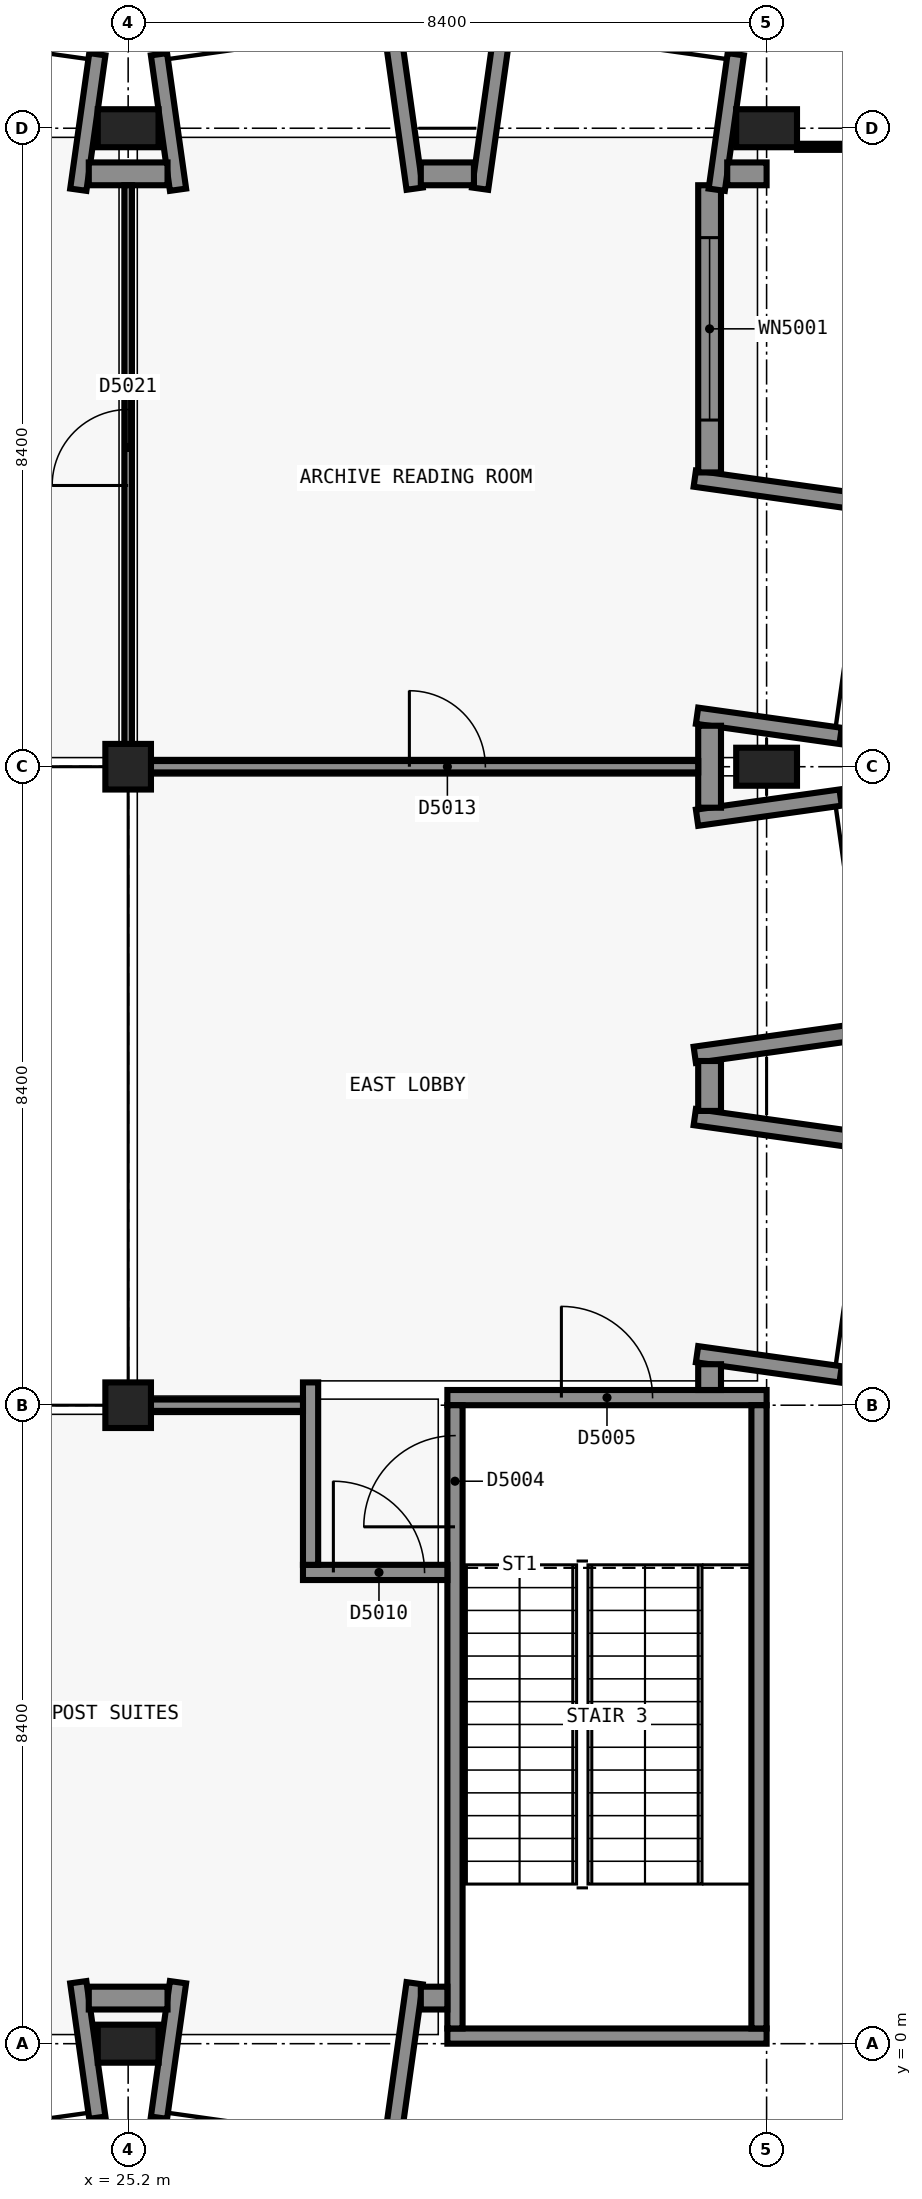
"""IFC4 building model, lengths in metres.
Left out: names, types, materials, properties, quantities, classifications, styles, units other than length and angle.
Written with IfcOpenShell. Run it as: python <this file> out.ifc"""

import sys

from ifc_helpers import new_model, si_unit, direction, frame, frame_2d, origin, origin_2d, place, context, subcontext, project, spatial, polyline, rectangle, outline, extrude, element, fill, save


model = new_model("IFC4")
c1 = context("Model", 3, precision=1e-05, world=origin(), true_north=direction((0.0, 1.0)))
c2 = subcontext(c1, "Body", "Model", "MODEL_VIEW")
j1 = project(units=[si_unit("LENGTHUNIT", "METRE"), si_unit("PLANEANGLEUNIT", "RADIAN")], contexts=[c1])
p1 = place(None, origin())
s1 = spatial("IfcSite", under=j1, at=p1, CompositionType="ELEMENT")
p2 = place(p1, origin())
s2 = spatial("IfcBuilding", under=s1, at=p2, CompositionType="ELEMENT")
p3 = place(p2, frame((0.0, 0.0, 24.6)))
s3 = spatial("IfcBuildingStorey", under=s2, at=p3, CompositionType="ELEMENT", Elevation=24.6)
p4 = place(p3, frame((33.6, 0.1, 0.0), z_axis=(0.0, 0.0, 1.0), x_axis=(-1.0, 0.0, 0.0)))
e1 = element("IfcWall", 1, at=p4, inside=s3, PredefinedType="SHEAR", context=c2, shape_type="SweptSolid", body=[
    extrude(rectangle(XDim=4.2, YDim=0.2, at=frame_2d((2.1, 0.0))), origin(), (0.0, 0.0, 1.0), 4.5),
])
p5 = place(p3, frame((29.4, 8.5, 0.0), z_axis=(0.0, 0.0, 1.0), x_axis=(1.0, 0.0, 0.0)))
e2 = element("IfcWall", 2, at=p5, inside=s3, PredefinedType="SHEAR", context=c2, shape_type="SweptSolid", body=[
    extrude(rectangle(XDim=4.2, YDim=0.2, at=frame_2d((2.1, 0.0))), origin(), (0.0, 0.0, 1.0), 4.5),
])
p6 = place(p5, frame((1.5, 0.0, 0.0)))
e3 = element("IfcOpeningElement", 3, at=p6, cuts=e2, PredefinedType="OPENING", context=c2, shape_type="SweptSolid", body=[
    extrude(rectangle(XDim=1.2, YDim=2.1, at=frame_2d((0.6, 1.05))), frame((0.0, 0.11, 0.0), z_axis=(0.0, -1.0, 0.0), x_axis=(1.0, 0.0, 0.0)), (0.0, 0.0, 1.0), 0.22),
])
p7 = place(p3, frame((29.5, 0.2, 0.0), z_axis=(0.0, 0.0, 1.0), x_axis=(0.0, 1.0, 0.0)))
e4 = element("IfcWall", 4, at=p7, inside=s3, PredefinedType="SHEAR", context=c2, shape_type="SweptSolid", body=[
    extrude(rectangle(XDim=8.2, YDim=0.2, at=frame_2d((4.1, 0.0))), origin(), (0.0, 0.0, 1.0), 4.5),
])
p8 = place(p7, frame((6.6, 0.0, 0.0)))
e5 = element("IfcOpeningElement", 5, at=p8, cuts=e4, PredefinedType="OPENING", context=c2, shape_type="SweptSolid", body=[
    extrude(rectangle(XDim=1.2, YDim=2.1, at=frame_2d((0.6, 1.05))), frame((0.0, 0.11, 0.0), z_axis=(0.0, -1.0, 0.0), x_axis=(1.0, 0.0, 0.0)), (0.0, 0.0, 1.0), 0.22),
])
p9 = place(p3, frame((33.5, 8.4, 0.0), z_axis=(0.0, 0.0, 1.0), x_axis=(0.0, -1.0, 0.0)))
e6 = element("IfcWall", 6, at=p9, inside=s3, PredefinedType="SHEAR", context=c2, shape_type="SweptSolid", body=[
    extrude(rectangle(XDim=8.2, YDim=0.2, at=frame_2d((4.1, 0.0))), origin(), (0.0, 0.0, 1.0), 4.5),
])
p10 = place(p3, frame((25.2, 0.0, 0.0), z_axis=(0.0, 0.0, 1.0), x_axis=(1.0, 0.0, 0.0)))
e7 = element("IfcColumn", 7, at=p10, inside=s3, PredefinedType="COLUMN", context=c2, shape_type="SweptSolid", body=[
    extrude(rectangle(XDim=0.8, YDim=0.5, at=origin_2d()), origin(), (0.0, 0.0, 1.0), 4.5),
])
for number, where, z_axis, x_axis in (
    (8, (25.2, 8.4, 0.0), (0.0, 0.0, 1.0), (1.0, 0.0, 0.0)),
    (9, (25.2, 16.8, 0.0), (0.0, 0.0, 1.0), (1.0, 0.0, 0.0)),
):
    element("IfcColumn", number, at=place(p3, frame(where, z_axis=z_axis, x_axis=x_axis)), inside=s3, PredefinedType="COLUMN", context=c2, shape_type="SweptSolid", body=[
        extrude(rectangle(XDim=0.6, YDim=0.6, at=origin_2d()), origin(), (0.0, 0.0, 1.0), 4.5),
    ])
for number, where, z_axis, x_axis in (
    (10, (25.2, 25.2, 0.0), (0.0, 0.0, 1.0), (1.0, 0.0, 0.0)),
    (11, (33.6, 16.8, 0.0), (0.0, 0.0, 1.0), (0.0, 1.0, 0.0)),
    (12, (33.6, 25.2, 0.0), (0.0, 0.0, 1.0), (1.0, 0.0, 0.0)),
):
    element("IfcColumn", number, at=place(p3, frame(where, z_axis=z_axis, x_axis=x_axis)), inside=s3, PredefinedType="COLUMN", context=c2, shape_type="SweptSolid", body=[
        extrude(rectangle(XDim=0.8, YDim=0.5, at=origin_2d()), origin(), (0.0, 0.0, 1.0), 4.5),
    ])
p11 = place(p3, frame((32.685, 9.071, 0.0), z_axis=(0.0, 0.0, 1.0), x_axis=(0.990269539441, -0.139162635989, 0.0)))
e13 = element("IfcWall", 13, at=p11, inside=s3, PredefinedType="SOLIDWALL", context=c2, shape_type="SweptSolid", body=[
    extrude(rectangle(XDim=1.907, YDim=0.215, at=frame_2d((0.954, 0.0))), origin(), (0.0, 0.0, 1.0), 4.2),
])
p12 = place(p3, frame((32.655, 12.19, 0.0), z_axis=(0.0, 0.0, 1.0), x_axis=(0.990276315141, -0.139114412161, 0.0)))
e14 = element("IfcWall", 14, at=p12, inside=s3, PredefinedType="SOLIDWALL", context=c2, shape_type="SweptSolid", body=[
    extrude(rectangle(XDim=2.371, YDim=0.215, at=frame_2d((1.186, 0.0))), origin(), (0.0, 0.0, 1.0), 4.2),
])
p13 = place(p3, frame((32.655, 13.01, 0.0), z_axis=(0.0, 0.0, 1.0), x_axis=(0.990262124675, 0.139215388641, 0.0)))
e15 = element("IfcWall", 15, at=p13, inside=s3, PredefinedType="SOLIDWALL", context=c2, shape_type="SweptSolid", body=[
    extrude(rectangle(XDim=2.371, YDim=0.215, at=frame_2d((1.186, 0.0))), origin(), (0.0, 0.0, 1.0), 4.2),
])
for number, where, z_axis, x_axis in (
    (16, (32.685, 16.129, 0.0), (0.0, 0.0, 1.0), (0.99, 0.139, 0.0)),
    (17, (32.685, 17.471, 0.0), (0.0, 0.0, 1.0), (0.99, -0.139, 0.0)),
):
    element("IfcWall", number, at=place(p3, frame(where, z_axis=z_axis, x_axis=x_axis)), inside=s3, PredefinedType="SOLIDWALL", context=c2, shape_type="SweptSolid", body=[
        extrude(rectangle(XDim=1.907, YDim=0.215, at=frame_2d((0.954, 0.0))), origin(), (0.0, 0.0, 1.0), 4.2),
    ])
p14 = place(p3, frame((32.655, 20.591, 0.0), z_axis=(0.0, 0.0, 1.0), x_axis=(0.990262124675, -0.139215388641, 0.0)))
e18 = element("IfcWall", 18, at=p14, inside=s3, PredefinedType="SOLIDWALL", context=c2, shape_type="SweptSolid", body=[
    extrude(rectangle(XDim=2.371, YDim=0.215, at=frame_2d((1.186, 0.0))), origin(), (0.0, 0.0, 1.0), 4.2),
])
p15 = place(p3, frame((32.85, 8.939, 0.0), z_axis=(0.0, 0.0, 1.0), x_axis=(0.0, -1.0, 0.0)))
e19 = element("IfcWall", 19, at=p15, inside=s3, PredefinedType="SOLIDWALL", context=c2, shape_type="SweptSolid", body=[
    extrude(rectangle(XDim=0.339, YDim=0.3, at=frame_2d((0.169, 0.0))), origin(), (0.0, 0.0, 1.0), 4.2),
])
p16 = place(p3, frame((32.85, 12.928, 0.0), z_axis=(0.0, 0.0, 1.0), x_axis=(0.0, -1.0, 0.0)))
e20 = element("IfcWall", 20, at=p16, inside=s3, PredefinedType="SOLIDWALL", context=c2, shape_type="SweptSolid", body=[
    extrude(rectangle(XDim=0.657, YDim=0.3, at=frame_2d((0.329, 0.0))), origin(), (0.0, 0.0, 1.0), 4.2),
])
p17 = place(p3, frame((32.85, 17.339, 0.0), z_axis=(0.0, 0.0, 1.0), x_axis=(0.0, -1.0, 0.0)))
e21 = element("IfcWall", 21, at=p17, inside=s3, PredefinedType="SOLIDWALL", context=c2, shape_type="SweptSolid", body=[
    extrude(rectangle(XDim=1.078, YDim=0.3, at=frame_2d((0.539, 0.0))), origin(), (0.0, 0.0, 1.0), 4.2),
])
p18 = place(p3, frame((32.85, 24.45, 0.0), z_axis=(0.0, 0.0, 1.0), x_axis=(0.0, -1.0, 0.0)))
e22 = element("IfcWall", 22, at=p18, inside=s3, PredefinedType="SOLIDWALL", context=c2, shape_type="SweptSolid", body=[
    extrude(rectangle(XDim=3.778, YDim=0.3, at=frame_2d((1.889, 0.0))), origin(), (0.0, 0.0, 1.0), 4.2),
])
p19 = place(p18, frame((0.689, 0.0, 0.9)))
e23 = element("IfcOpeningElement", 23, at=p19, cuts=e22, PredefinedType="OPENING", context=c2, shape_type="SweptSolid", body=[
    extrude(rectangle(XDim=2.4, YDim=1.5, at=frame_2d((1.2, 0.75))), frame((0.0, 0.16, 0.0), z_axis=(0.0, -1.0, 0.0), x_axis=(1.0, 0.0, 0.0)), (0.0, 0.0, 1.0), 0.32),
])
for number, where, z_axis, x_axis in (
    (24, (24.544, 24.391, 0.0), (0.0, 0.0, 1.0), (0.139, 0.99, 0.0)),
    (25, (25.856, 24.391, 0.0), (0.0, 0.0, 1.0), (-0.139, 0.99, 0.0)),
):
    element("IfcWall", number, at=place(p3, frame(where, z_axis=z_axis, x_axis=x_axis)), inside=s3, PredefinedType="SOLIDWALL", context=c2, shape_type="SweptSolid", body=[
        extrude(rectangle(XDim=1.8, YDim=0.215, at=frame_2d((0.9, 0.0))), origin(), (0.0, 0.0, 1.0), 4.2),
    ])
p20 = place(p3, frame((28.969, 24.405, 0.0), z_axis=(0.0, 0.0, 1.0), x_axis=(-0.139249775508, 0.99025728981, 0.0)))
e26 = element("IfcWall", 26, at=p20, inside=s3, PredefinedType="SOLIDWALL", context=c2, shape_type="SweptSolid", body=[
    extrude(rectangle(XDim=2.22, YDim=0.215, at=frame_2d((1.11, 0.0))), origin(), (0.0, 0.0, 1.0), 4.2),
])
p21 = place(p3, frame((29.831, 24.405, 0.0), z_axis=(0.0, 0.0, 1.0), x_axis=(0.139141913905, 0.990272451295, 0.0)))
e27 = element("IfcWall", 27, at=p21, inside=s3, PredefinedType="SOLIDWALL", context=c2, shape_type="SweptSolid", body=[
    extrude(rectangle(XDim=2.219, YDim=0.215, at=frame_2d((1.11, 0.0))), origin(), (0.0, 0.0, 1.0), 4.2),
])
p22 = place(p3, frame((32.944, 24.391, 0.0), z_axis=(0.0, 0.0, 1.0), x_axis=(0.139161311926, 0.990269725511, 0.0)))
e28 = element("IfcWall", 28, at=p22, inside=s3, PredefinedType="SOLIDWALL", context=c2, shape_type="SweptSolid", body=[
    extrude(rectangle(XDim=1.8, YDim=0.215, at=frame_2d((0.9, 0.0))), origin(), (0.0, 0.0, 1.0), 4.2),
])
p23 = place(p3, frame((24.682, 24.6, 0.0), z_axis=(0.0, 0.0, 1.0), x_axis=(1.0, 0.0, 0.0)))
e29 = element("IfcWall", 29, at=p23, inside=s3, PredefinedType="SOLIDWALL", context=c2, shape_type="SweptSolid", body=[
    extrude(rectangle(XDim=1.036, YDim=0.3, at=frame_2d((0.518, 0.0))), origin(), (0.0, 0.0, 1.0), 4.2),
])
p24 = place(p3, frame((29.051, 24.6, 0.0), z_axis=(0.0, 0.0, 1.0), x_axis=(1.0, 0.0, 0.0)))
e30 = element("IfcWall", 30, at=p24, inside=s3, PredefinedType="SOLIDWALL", context=c2, shape_type="SweptSolid", body=[
    extrude(rectangle(XDim=0.699, YDim=0.3, at=frame_2d((0.35, 0.0))), origin(), (0.0, 0.0, 1.0), 4.2),
])
p25 = place(p3, frame((33.082, 24.6, 0.0), z_axis=(0.0, 0.0, 1.0), x_axis=(1.0, 0.0, 0.0)))
e31 = element("IfcWall", 31, at=p25, inside=s3, PredefinedType="SOLIDWALL", context=c2, shape_type="SweptSolid", body=[
    extrude(rectangle(XDim=0.518, YDim=0.3, at=frame_2d((0.259, 0.0))), origin(), (0.0, 0.0, 1.0), 4.2),
])
for number, where, z_axis, x_axis in (
    (32, (24.544, 0.809, 0.0), (0.0, 0.0, 1.0), (0.139, -0.99, 0.0)),
    (33, (25.856, 0.809, 0.0), (0.0, 0.0, 1.0), (-0.139, -0.99, 0.0)),
):
    element("IfcWall", number, at=place(p3, frame(where, z_axis=z_axis, x_axis=x_axis)), inside=s3, PredefinedType="SOLIDWALL", context=c2, shape_type="SweptSolid", body=[
        extrude(rectangle(XDim=1.8, YDim=0.215, at=frame_2d((0.9, 0.0))), origin(), (0.0, 0.0, 1.0), 4.2),
    ])
p26 = place(p3, frame((28.969, 0.795, 0.0), z_axis=(0.0, 0.0, 1.0), x_axis=(-0.139249775508, -0.99025728981, 0.0)))
e34 = element("IfcWall", 34, at=p26, inside=s3, PredefinedType="SOLIDWALL", context=c2, shape_type="SweptSolid", body=[
    extrude(rectangle(XDim=2.22, YDim=0.215, at=frame_2d((1.11, 0.0))), origin(), (0.0, 0.0, 1.0), 4.2),
])
p27 = place(p3, frame((25.718, 0.6, 0.0), z_axis=(0.0, 0.0, 1.0), x_axis=(-1.0, 0.0, 0.0)))
e35 = element("IfcWall", 35, at=p27, inside=s3, PredefinedType="SOLIDWALL", context=c2, shape_type="SweptSolid", body=[
    extrude(rectangle(XDim=1.036, YDim=0.3, at=frame_2d((0.518, 0.0))), origin(), (0.0, 0.0, 1.0), 4.2),
])
p28 = place(p3, frame((29.4, 0.6, 0.0), z_axis=(0.0, 0.0, 1.0), x_axis=(-1.0, 0.0, 0.0)))
e36 = element("IfcWall", 36, at=p28, inside=s3, PredefinedType="SOLIDWALL", context=c2, shape_type="SweptSolid", body=[
    extrude(rectangle(XDim=0.349, YDim=0.3, at=frame_2d((0.175, 0.0))), origin(), (0.0, 0.0, 1.0), 4.2),
])
p29 = place(p3, frame((34.0, 24.956, 0.0), z_axis=(0.0, 0.0, 1.0), x_axis=(1.0, 0.0, 0.0)))
e37 = element("IfcWall", 37, at=p29, inside=s3, PredefinedType="MOVABLE", context=c2, shape_type="SweptSolid", body=[
    extrude(outline(polyline([(0.0, 0.0), (3.8, 0.0), (3.8, 1.412), (0.0, 0.135), (0.0, 0.0)])), frame((0.0, 0.04, 0.0), z_axis=(0.0, -1.0, 0.0), x_axis=(1.0, 0.0, 0.0)), (0.0, 0.0, 1.0), 0.08),
])
p30 = place(p3, frame((27.5, 6.2, 0.0), z_axis=(0.0, 0.0, 1.0), x_axis=(1.0, 0.0, 0.0)))
e38 = element("IfcWall", 38, at=p30, inside=s3, PredefinedType="SOLIDWALL", context=c2, shape_type="SweptSolid", body=[
    extrude(rectangle(XDim=1.9, YDim=0.2, at=frame_2d((0.95, 0.0))), origin(), (0.0, 0.0, 1.0), 4.2),
])
p31 = place(p30, frame((0.4, 0.0, 0.0)))
e39 = element("IfcOpeningElement", 39, at=p31, cuts=e38, PredefinedType="OPENING", context=c2, shape_type="SweptSolid", body=[
    extrude(rectangle(XDim=1.2, YDim=2.1, at=frame_2d((0.6, 1.05))), frame((0.0, 0.11, 0.0), z_axis=(0.0, -1.0, 0.0), x_axis=(1.0, 0.0, 0.0)), (0.0, 0.0, 1.0), 0.22),
])
p32 = place(p3, frame((27.6, 6.3, 0.0), z_axis=(0.0, 0.0, 1.0), x_axis=(0.0, 1.0, 0.0)))
e40 = element("IfcWall", 40, at=p32, inside=s3, PredefinedType="SOLIDWALL", context=c2, shape_type="SweptSolid", body=[
    extrude(rectangle(XDim=2.4, YDim=0.2, at=frame_2d((1.2, 0.0))), origin(), (0.0, 0.0, 1.0), 3.7),
])
p33 = place(p3, frame((25.125, 8.4, 0.0), z_axis=(0.0, 0.0, 1.0), x_axis=(1.0, 0.0, 0.0)))
e41 = element("IfcWall", 41, at=p33, inside=s3, PredefinedType="PARTITIONING", context=c2, shape_type="SweptSolid", body=[
    extrude(rectangle(XDim=2.375, YDim=0.15, at=frame_2d((1.188, 0.0))), origin(), (0.0, 0.0, 1.0), 3.5),
])
p34 = place(p3, frame((25.125, 16.8, 0.0), z_axis=(0.0, 0.0, 1.0), x_axis=(1.0, 0.0, 0.0)))
e42 = element("IfcWall", 42, at=p34, inside=s3, PredefinedType="PARTITIONING", context=c2, shape_type="SweptSolid", body=[
    extrude(rectangle(XDim=7.575, YDim=0.15, at=frame_2d((3.788, 0.0))), origin(), (0.0, 0.0, 1.0), 3.5),
])
p35 = place(p34, frame((3.775, 0.0, 0.0)))
e43 = element("IfcOpeningElement", 43, at=p35, cuts=e42, PredefinedType="OPENING", context=c2, shape_type="SweptSolid", body=[
    extrude(rectangle(XDim=1.0, YDim=2.1, at=frame_2d((0.5, 1.05))), frame((0.0, 0.085, 0.0), z_axis=(0.0, -1.0, 0.0), x_axis=(1.0, 0.0, 0.0)), (0.0, 0.0, 1.0), 0.17),
])
p36 = place(p3, frame((25.2, 16.875, 0.0), z_axis=(0.0, 0.0, 1.0), x_axis=(0.0, 1.0, 0.0)))
e44 = element("IfcWall", 44, at=p36, inside=s3, PredefinedType="PARTITIONING", context=c2, shape_type="SweptSolid", body=[
    extrude(rectangle(XDim=7.575, YDim=0.1, at=frame_2d((3.788, 0.0))), origin(), (0.0, 0.0, 1.0), 3.5),
])
p37 = place(p36, frame((3.625, 0.0, 0.0)))
e45 = element("IfcOpeningElement", 45, at=p37, cuts=e44, PredefinedType="OPENING", context=c2, shape_type="SweptSolid", body=[
    extrude(rectangle(XDim=1.0, YDim=2.1, at=frame_2d((0.5, 1.05))), frame((0.0, 0.06, 0.0), z_axis=(0.0, -1.0, 0.0), x_axis=(1.0, 0.0, 0.0)), (0.0, 0.0, 1.0), 0.12),
])
p38 = place(p19, origin())
e46 = element("IfcWindow", 46, at=p38, inside=s3, PartitioningType="SINGLE_PANEL", PredefinedType="WINDOW", context=c2, shape_type="SweptSolid", body=[
    extrude(rectangle(XDim=2.4, YDim=1.5, at=frame_2d((1.2, 0.75))), frame((0.0, 0.03, 0.0), z_axis=(0.0, -1.0, 0.0), x_axis=(1.0, 0.0, 0.0)), (0.0, 0.0, 1.0), 0.06),
])
fill(e23, e46)
p39 = place(p8, origin())
e47 = element("IfcDoor", 47, at=p39, inside=s3, OperationType="SINGLE_SWING_RIGHT", PredefinedType="DOOR", context=c2, shape_type="SweptSolid", body=[
    extrude(rectangle(XDim=1.2, YDim=2.1, at=frame_2d((0.6, 1.05))), frame((0.0, 0.025, 0.0), z_axis=(0.0, -1.0, 0.0), x_axis=(1.0, 0.0, 0.0)), (0.0, 0.0, 1.0), 0.05),
])
fill(e5, e47)
p40 = place(p6, origin())
e48 = element("IfcDoor", 48, at=p40, inside=s3, OperationType="SINGLE_SWING_RIGHT", PredefinedType="DOOR", context=c2, shape_type="SweptSolid", body=[
    extrude(rectangle(XDim=1.2, YDim=2.1, at=frame_2d((0.6, 1.05))), frame((0.0, 0.025, 0.0), z_axis=(0.0, -1.0, 0.0), x_axis=(1.0, 0.0, 0.0)), (0.0, 0.0, 1.0), 0.05),
])
fill(e3, e48)
p41 = place(p31, origin())
e49 = element("IfcDoor", 49, at=p41, inside=s3, OperationType="SINGLE_SWING_RIGHT", PredefinedType="DOOR", context=c2, shape_type="SweptSolid", body=[
    extrude(rectangle(XDim=1.2, YDim=2.1, at=frame_2d((0.6, 1.05))), frame((0.0, 0.025, 0.0), z_axis=(0.0, -1.0, 0.0), x_axis=(1.0, 0.0, 0.0)), (0.0, 0.0, 1.0), 0.05),
])
fill(e39, e49)
p42 = place(p35, origin())
e50 = element("IfcDoor", 50, at=p42, inside=s3, OperationType="SINGLE_SWING_LEFT", PredefinedType="DOOR", context=c2, shape_type="SweptSolid", body=[
    extrude(rectangle(XDim=1.0, YDim=2.1, at=frame_2d((0.5, 1.05))), frame((0.0, 0.025, 0.0), z_axis=(0.0, -1.0, 0.0), x_axis=(1.0, 0.0, 0.0)), (0.0, 0.0, 1.0), 0.05),
])
fill(e43, e50)
p43 = place(p37, origin())
e51 = element("IfcDoor", 51, at=p43, inside=s3, OperationType="SINGLE_SWING_RIGHT", PredefinedType="DOOR", context=c2, shape_type="SweptSolid", body=[
    extrude(rectangle(XDim=1.0, YDim=2.1, at=frame_2d((0.5, 1.05))), frame((0.0, 0.025, 0.0), z_axis=(0.0, -1.0, 0.0), x_axis=(1.0, 0.0, 0.0)), (0.0, 0.0, 1.0), 0.05),
])
fill(e45, e51)
save(model, sys.argv[1])
